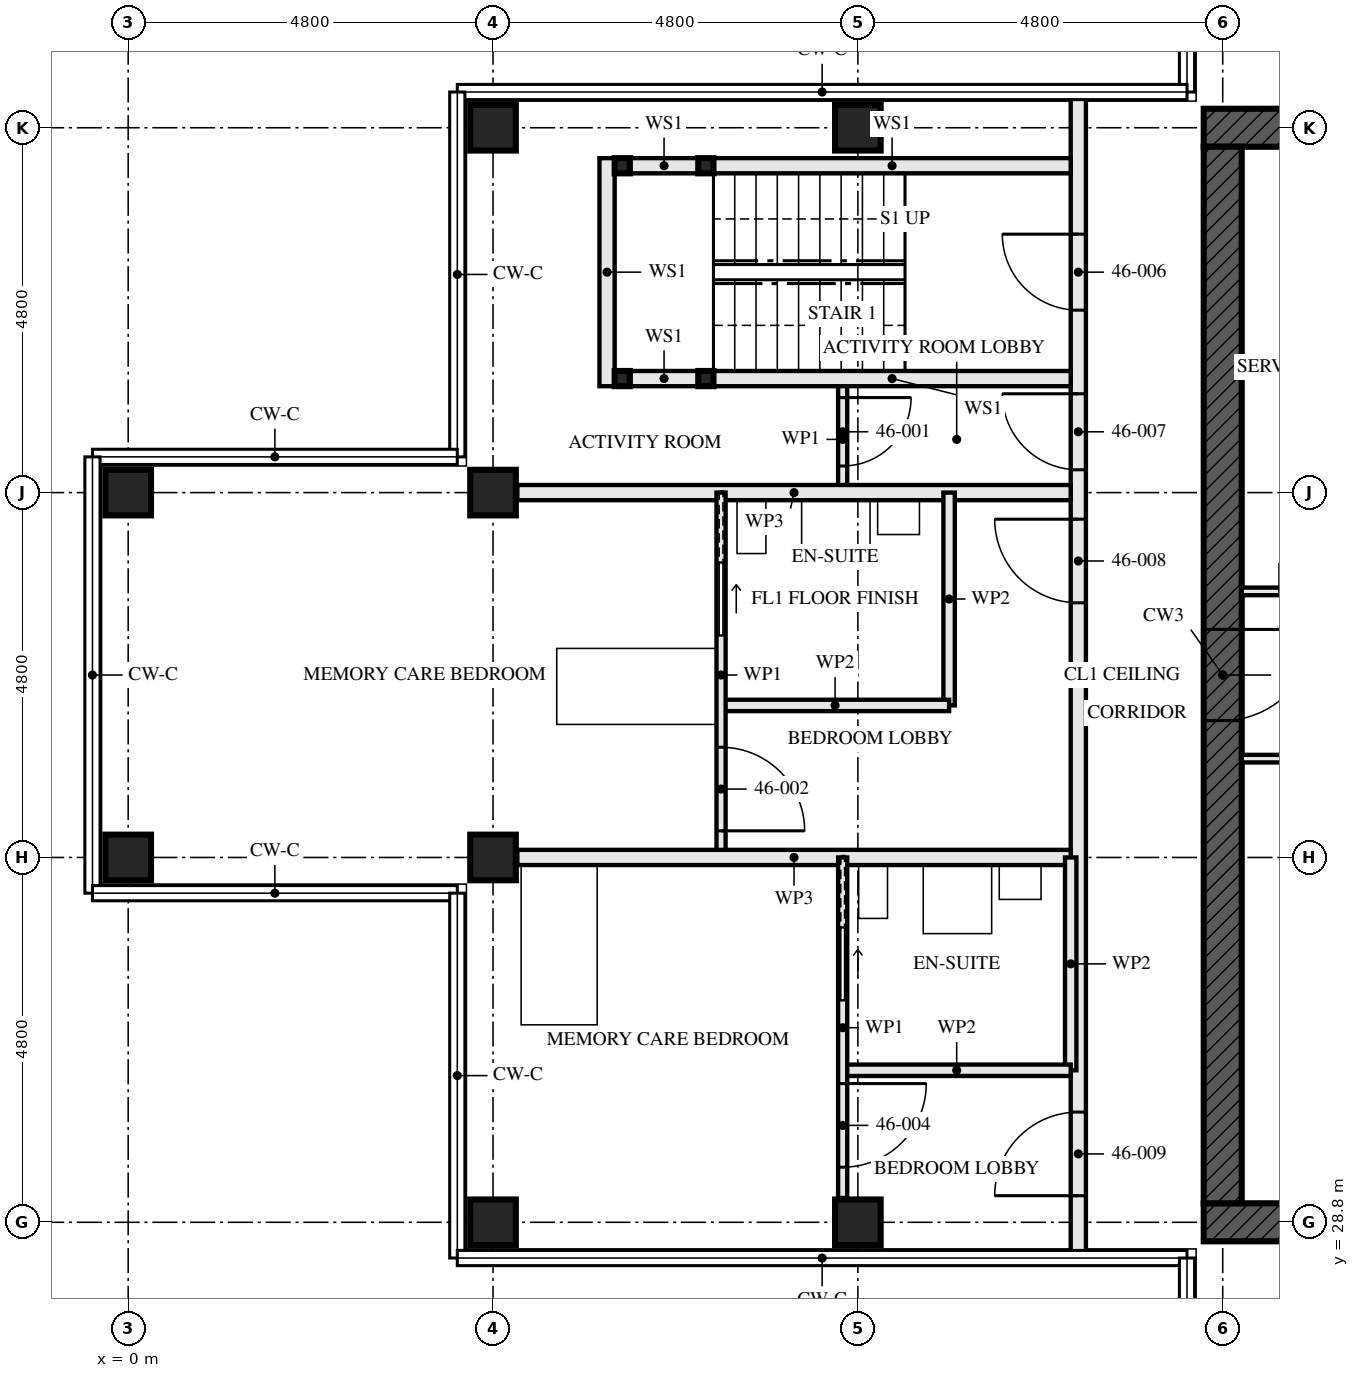
"""IFC4 building model, lengths in metres.
Left out: names, types, materials, properties, quantities, classifications, styles, units other than length and angle.
Written with IfcOpenShell. Run it as: python <this file> out.ifc"""

import sys

from ifc_helpers import new_model, si_unit, direction, frame, frame_2d, origin, origin_2d, place, context, subcontext, project, spatial, rectangle, hollow_rectangle, extrude, element, fill, save


model = new_model("IFC4")
c1 = context("Model", 3, precision=1e-05, world=origin(), true_north=direction((0.0, 1.0)))
c2 = subcontext(c1, "Body", "Model", "MODEL_VIEW")
j1 = project(units=[si_unit("LENGTHUNIT", "METRE"), si_unit("PLANEANGLEUNIT", "RADIAN")], contexts=[c1])
p1 = place(None, origin())
s1 = spatial("IfcSite", under=j1, at=p1, CompositionType="ELEMENT")
p2 = place(p1, origin())
s2 = spatial("IfcBuilding", under=s1, at=p2, CompositionType="ELEMENT")
p3 = place(p2, frame((0.0, 0.0, 169.0)))
s3 = spatial("IfcBuildingStorey", under=s2, at=p3, CompositionType="ELEMENT", Elevation=169.0)
for number, where, z_axis, x_axis in (
    (1, (0.0, 33.6, 0.0), (0.0, 0.0, 1.0), (0.0, 1.0, 0.0)),
    (2, (0.0, 38.4, 0.0), (0.0, 0.0, 1.0), (0.0, 1.0, 0.0)),
    (3, (4.8, 28.8, 0.0), (0.0, 0.0, 1.0), (0.0, 1.0, 0.0)),
    (4, (4.8, 33.6, 0.0), (0.0, 0.0, 1.0), (0.0, 1.0, 0.0)),
    (5, (4.8, 38.4, 0.0), (0.0, 0.0, 1.0), (0.0, 1.0, 0.0)),
    (6, (4.8, 43.2, 0.0), (0.0, 0.0, 1.0), (0.0, 1.0, 0.0)),
):
    element("IfcColumn", number, at=place(p3, frame(where, z_axis=z_axis, x_axis=x_axis)), inside=s3, PredefinedType="COLUMN", context=c2, shape_type="SweptSolid", body=[
        extrude(hollow_rectangle(XDim=0.6, YDim=0.6, WallThickness=0.06, at=origin_2d()), origin(), (0.0, 0.0, 1.0), 3.5),
    ])
for number, where, z_axis, x_axis in (
    (7, (9.6, 28.8, 0.0), (0.0, 0.0, 1.0), (0.0, 1.0, 0.0)),
    (8, (9.6, 43.2, 0.0), (0.0, 0.0, 1.0), (0.0, 1.0, 0.0)),
):
    element("IfcColumn", number, at=place(p3, frame(where, z_axis=z_axis, x_axis=x_axis)), inside=s3, PredefinedType="COLUMN", context=c2, shape_type="SweptSolid", body=[
        extrude(hollow_rectangle(XDim=0.6, YDim=0.6, WallThickness=0.08, at=origin_2d()), origin(), (0.0, 0.0, 1.0), 3.5),
    ])
p4 = place(p3, frame((14.15, 28.8, -0.17), z_axis=(0.0, 0.0, 1.0), x_axis=(1.0, 0.0, 0.0)))
e9 = element("IfcWall", 9, at=p4, inside=s3, PredefinedType="SHEAR", context=c2, shape_type="SweptSolid", body=[
    extrude(rectangle(XDim=14.9, YDim=0.5, at=frame_2d((7.45, 0.0))), origin(), (0.0, 0.0, 1.0), 3.5),
])
p5 = place(p4, frame((6.85, 0.0, 0.17)))
e10 = element("IfcOpeningElement", 10, at=p5, cuts=e9, PredefinedType="OPENING", context=c2, shape_type="SweptSolid", body=[
    extrude(rectangle(XDim=1.2, YDim=2.1, at=frame_2d((0.6, 1.05))), frame((0.0, 0.26, 0.0), z_axis=(0.0, -1.0, 0.0), x_axis=(1.0, 0.0, 0.0)), (0.0, 0.0, 1.0), 0.521),
])
p6 = place(p3, frame((29.05, 43.2, -0.17), z_axis=(0.0, 0.0, 1.0), x_axis=(-1.0, 0.0, 0.0)))
e11 = element("IfcWall", 11, at=p6, inside=s3, PredefinedType="SHEAR", context=c2, shape_type="SweptSolid", body=[
    extrude(rectangle(XDim=14.9, YDim=0.5, at=frame_2d((7.45, 0.0))), origin(), (0.0, 0.0, 1.0), 3.5),
])
p7 = place(p6, frame((6.85, 0.0, 0.17)))
e12 = element("IfcOpeningElement", 12, at=p7, cuts=e11, PredefinedType="OPENING", context=c2, shape_type="SweptSolid", body=[
    extrude(rectangle(XDim=1.2, YDim=2.1, at=frame_2d((0.6, 1.05))), frame((0.0, 0.26, 0.0), z_axis=(0.0, -1.0, 0.0), x_axis=(1.0, 0.0, 0.0)), (0.0, 0.0, 1.0), 0.521),
])
p8 = place(p3, frame((14.4, 42.95, -0.17), z_axis=(0.0, 0.0, 1.0), x_axis=(0.0, -1.0, 0.0)))
e13 = element("IfcWall", 13, at=p8, inside=s3, PredefinedType="SHEAR", context=c2, shape_type="SweptSolid", body=[
    extrude(rectangle(XDim=13.9, YDim=0.5, at=frame_2d((6.95, 0.0))), origin(), (0.0, 0.0, 1.0), 3.5),
])
p9 = place(p8, frame((6.35, 0.0, 0.17)))
e14 = element("IfcOpeningElement", 14, at=p9, cuts=e13, PredefinedType="OPENING", context=c2, shape_type="SweptSolid", body=[
    extrude(rectangle(XDim=1.2, YDim=2.1, at=frame_2d((0.6, 1.05))), frame((0.0, 0.26, 0.0), z_axis=(0.0, -1.0, 0.0), x_axis=(1.0, 0.0, 0.0)), (0.0, 0.0, 1.0), 0.521),
])
for number, where, z_axis, x_axis in (
    (15, (6.5, 42.7, 0.0), (0.0, 0.0, 1.0), (1.0, 0.0, 0.0)),
    (16, (6.5, 39.9, 0.0), (0.0, 0.0, 1.0), (1.0, 0.0, 0.0)),
    (17, (7.6, 42.7, 0.0), (0.0, 0.0, 1.0), (1.0, 0.0, 0.0)),
    (18, (7.6, 39.9, 0.0), (0.0, 0.0, 1.0), (1.0, 0.0, 0.0)),
):
    element("IfcColumn", number, at=place(p3, frame(where, z_axis=z_axis, x_axis=x_axis)), inside=s3, PredefinedType="COLUMN", context=c2, shape_type="SweptSolid", body=[
        extrude(hollow_rectangle(XDim=0.2, YDim=0.2, WallThickness=0.008, at=origin_2d()), origin(), (0.0, 0.0, 1.0), 3.33),
    ])
p10 = place(p3, frame((6.6, 42.7, 0.0), z_axis=(0.0, 0.0, 1.0), x_axis=(1.0, 0.0, 0.0)))
e19 = element("IfcWall", 19, at=p10, inside=s3, PredefinedType="SOLIDWALL", context=c2, shape_type="SweptSolid", body=[
    extrude(rectangle(XDim=0.9, YDim=0.2, at=frame_2d((0.45, 0.0))), origin(), (0.0, 0.0, 1.0), 2.99),
])
p11 = place(p3, frame((7.7, 42.7, 0.0), z_axis=(0.0, 0.0, 1.0), x_axis=(1.0, 0.0, 0.0)))
e20 = element("IfcWall", 20, at=p11, inside=s3, PredefinedType="SOLIDWALL", context=c2, shape_type="SweptSolid", body=[
    extrude(rectangle(XDim=4.7, YDim=0.2, at=frame_2d((2.35, 0.0))), origin(), (0.0, 0.0, 1.0), 2.99),
])
p12 = place(p3, frame((6.6, 39.9, 0.0), z_axis=(0.0, 0.0, 1.0), x_axis=(1.0, 0.0, 0.0)))
e21 = element("IfcWall", 21, at=p12, inside=s3, PredefinedType="SOLIDWALL", context=c2, shape_type="SweptSolid", body=[
    extrude(rectangle(XDim=0.9, YDim=0.2, at=frame_2d((0.45, 0.0))), origin(), (0.0, 0.0, 1.0), 2.99),
])
p13 = place(p3, frame((7.7, 39.9, 0.0), z_axis=(0.0, 0.0, 1.0), x_axis=(1.0, 0.0, 0.0)))
e22 = element("IfcWall", 22, at=p13, inside=s3, PredefinedType="SOLIDWALL", context=c2, shape_type="SweptSolid", body=[
    extrude(rectangle(XDim=4.7, YDim=0.2, at=frame_2d((2.35, 0.0))), origin(), (0.0, 0.0, 1.0), 2.99),
])
p14 = place(p3, frame((6.3, 42.8, 0.0), z_axis=(0.0, 0.0, 1.0), x_axis=(0.0, -1.0, 0.0)))
e23 = element("IfcWall", 23, at=p14, inside=s3, PredefinedType="SOLIDWALL", context=c2, shape_type="SweptSolid", body=[
    extrude(rectangle(XDim=3.0, YDim=0.2, at=frame_2d((1.5, 0.0))), origin(), (0.0, 0.0, 1.0), 3.33),
])
p15 = place(p3, frame((9.4, 39.8, 0.0), z_axis=(0.0, 0.0, 1.0), x_axis=(0.0, -1.0, 0.0)))
e24 = element("IfcWall", 24, at=p15, inside=s3, PredefinedType="PARTITIONING", context=c2, shape_type="SweptSolid", body=[
    extrude(rectangle(XDim=1.4, YDim=0.12, at=frame_2d((0.7, 0.0))), origin(), (0.0, 0.0, 1.0), 3.33),
])
p16 = place(p15, frame((0.15, 0.0, 0.0)))
e25 = element("IfcOpeningElement", 25, at=p16, cuts=e24, PredefinedType="OPENING", context=c2, shape_type="SweptSolid", body=[
    extrude(rectangle(XDim=0.9, YDim=2.1, at=frame_2d((0.45, 1.05))), frame((0.0, 0.071, 0.0), z_axis=(0.0, -1.0, 0.0), x_axis=(1.0, 0.0, 0.0)), (0.0, 0.0, 1.0), 0.141),
])
p17 = place(p3, frame((5.12, 38.4, 0.0), z_axis=(0.0, 0.0, 1.0), x_axis=(1.0, 0.0, 0.0)))
e26 = element("IfcWall", 26, at=p17, inside=s3, PredefinedType="PARTITIONING", context=c2, shape_type="SweptSolid", body=[
    extrude(rectangle(XDim=7.28, YDim=0.2, at=frame_2d((3.64, 0.0))), origin(), (0.0, 0.0, 1.0), 2.55),
])
p18 = place(p3, frame((7.8, 35.6, 0.0), z_axis=(0.0, 0.0, 1.0), x_axis=(1.0, 0.0, 0.0)))
e27 = element("IfcWall", 27, at=p18, inside=s3, PredefinedType="PARTITIONING", context=c2, shape_type="SweptSolid", body=[
    extrude(rectangle(XDim=3.0, YDim=0.15, at=frame_2d((1.5, 0.0))), origin(), (0.0, 0.0, 1.0), 3.33),
])
p19 = place(p3, frame((10.8, 38.4, 0.0), z_axis=(0.0, 0.0, 1.0), x_axis=(0.0, -1.0, 0.0)))
e28 = element("IfcWall", 28, at=p19, inside=s3, PredefinedType="PARTITIONING", context=c2, shape_type="SweptSolid", body=[
    extrude(rectangle(XDim=2.8, YDim=0.15, at=frame_2d((1.4, 0.0))), origin(), (0.0, 0.0, 1.0), 3.33),
])
p20 = place(p3, frame((7.8, 38.4, 0.0), z_axis=(0.0, 0.0, 1.0), x_axis=(0.0, -1.0, 0.0)))
e29 = element("IfcWall", 29, at=p20, inside=s3, PredefinedType="PARTITIONING", context=c2, shape_type="SweptSolid", body=[
    extrude(rectangle(XDim=4.8, YDim=0.12, at=frame_2d((2.4, 0.0))), origin(), (0.0, 0.0, 1.0), 3.33),
])
p21 = place(p20, frame((3.35, 0.0, 0.0)))
e30 = element("IfcOpeningElement", 30, at=p21, cuts=e29, PredefinedType="OPENING", context=c2, shape_type="SweptSolid", body=[
    extrude(rectangle(XDim=1.1, YDim=2.1, at=frame_2d((0.55, 1.05))), frame((0.0, 0.071, 0.0), z_axis=(0.0, -1.0, 0.0), x_axis=(1.0, 0.0, 0.0)), (0.0, 0.0, 1.0), 0.141),
])
p22 = place(p20, frame((0.925, 0.0, 0.0)))
e31 = element("IfcOpeningElement", 31, at=p22, cuts=e29, PredefinedType="OPENING", context=c2, shape_type="SweptSolid", body=[
    extrude(rectangle(XDim=0.95, YDim=2.1, at=frame_2d((0.475, 1.05))), frame((0.0, 0.071, 0.0), z_axis=(0.0, -1.0, 0.0), x_axis=(1.0, 0.0, 0.0)), (0.0, 0.0, 1.0), 0.141),
])
p23 = place(p3, frame((5.12, 33.6, 0.0), z_axis=(0.0, 0.0, 1.0), x_axis=(1.0, 0.0, 0.0)))
e32 = element("IfcWall", 32, at=p23, inside=s3, PredefinedType="PARTITIONING", context=c2, shape_type="SweptSolid", body=[
    extrude(rectangle(XDim=7.28, YDim=0.2, at=frame_2d((3.64, 0.0))), origin(), (0.0, 0.0, 1.0), 2.55),
])
p24 = place(p3, frame((9.4, 30.8, 0.0), z_axis=(0.0, 0.0, 1.0), x_axis=(1.0, 0.0, 0.0)))
e33 = element("IfcWall", 33, at=p24, inside=s3, PredefinedType="PARTITIONING", context=c2, shape_type="SweptSolid", body=[
    extrude(rectangle(XDim=3.0, YDim=0.15, at=frame_2d((1.5, 0.0))), origin(), (0.0, 0.0, 1.0), 3.33),
])
p25 = place(p3, frame((12.4, 33.6, 0.0), z_axis=(0.0, 0.0, 1.0), x_axis=(0.0, -1.0, 0.0)))
e34 = element("IfcWall", 34, at=p25, inside=s3, PredefinedType="PARTITIONING", context=c2, shape_type="SweptSolid", body=[
    extrude(rectangle(XDim=2.8, YDim=0.15, at=frame_2d((1.4, 0.0))), origin(), (0.0, 0.0, 1.0), 3.33),
])
p26 = place(p3, frame((9.4, 33.6, 0.0), z_axis=(0.0, 0.0, 1.0), x_axis=(0.0, -1.0, 0.0)))
e35 = element("IfcWall", 35, at=p26, inside=s3, PredefinedType="PARTITIONING", context=c2, shape_type="SweptSolid", body=[
    extrude(rectangle(XDim=4.48, YDim=0.12, at=frame_2d((2.24, 0.0))), origin(), (0.0, 0.0, 1.0), 3.33),
])
p27 = place(p26, frame((2.975, 0.0, 0.0)))
e36 = element("IfcOpeningElement", 36, at=p27, cuts=e35, PredefinedType="OPENING", context=c2, shape_type="SweptSolid", body=[
    extrude(rectangle(XDim=1.1, YDim=2.1, at=frame_2d((0.55, 1.05))), frame((0.0, 0.071, 0.0), z_axis=(0.0, -1.0, 0.0), x_axis=(1.0, 0.0, 0.0)), (0.0, 0.0, 1.0), 0.141),
])
p28 = place(p26, frame((0.925, 0.0, 0.0)))
e37 = element("IfcOpeningElement", 37, at=p28, cuts=e35, PredefinedType="OPENING", context=c2, shape_type="SweptSolid", body=[
    extrude(rectangle(XDim=0.95, YDim=2.1, at=frame_2d((0.475, 1.05))), frame((0.0, 0.071, 0.0), z_axis=(0.0, -1.0, 0.0), x_axis=(1.0, 0.0, 0.0)), (0.0, 0.0, 1.0), 0.141),
])
p29 = place(p3, frame((12.5, 43.65, 0.0), z_axis=(0.0, 0.0, 1.0), x_axis=(0.0, -1.0, 0.0)))
e38 = element("IfcWall", 38, at=p29, inside=s3, PredefinedType="PARTITIONING", context=c2, shape_type="SweptSolid", body=[
    extrude(rectangle(XDim=15.3, YDim=0.2, at=frame_2d((7.65, 0.0))), origin(), (0.0, 0.0, 1.0), 2.32),
])
p30 = place(p29, frame((1.85, 0.0, 0.0)))
e39 = element("IfcOpeningElement", 39, at=p30, cuts=e38, PredefinedType="OPENING", context=c2, shape_type="SweptSolid", body=[
    extrude(rectangle(XDim=1.0, YDim=2.1, at=frame_2d((0.5, 1.05))), frame((0.0, 0.111, 0.0), z_axis=(0.0, -1.0, 0.0), x_axis=(1.0, 0.0, 0.0)), (0.0, 0.0, 1.0), 0.221),
])
p31 = place(p29, frame((3.95, 0.0, 0.0)))
e40 = element("IfcOpeningElement", 40, at=p31, cuts=e38, PredefinedType="OPENING", context=c2, shape_type="SweptSolid", body=[
    extrude(rectangle(XDim=1.0, YDim=2.1, at=frame_2d((0.5, 1.05))), frame((0.0, 0.111, 0.0), z_axis=(0.0, -1.0, 0.0), x_axis=(1.0, 0.0, 0.0)), (0.0, 0.0, 1.0), 0.221),
])
p32 = place(p29, frame((5.6, 0.0, 0.0)))
e41 = element("IfcOpeningElement", 41, at=p32, cuts=e38, PredefinedType="OPENING", context=c2, shape_type="SweptSolid", body=[
    extrude(rectangle(XDim=1.1, YDim=2.1, at=frame_2d((0.55, 1.05))), frame((0.0, 0.111, 0.0), z_axis=(0.0, -1.0, 0.0), x_axis=(1.0, 0.0, 0.0)), (0.0, 0.0, 1.0), 0.221),
])
p33 = place(p29, frame((13.4, 0.0, 0.0)))
e42 = element("IfcOpeningElement", 42, at=p33, cuts=e38, PredefinedType="OPENING", context=c2, shape_type="SweptSolid", body=[
    extrude(rectangle(XDim=1.1, YDim=2.1, at=frame_2d((0.55, 1.05))), frame((0.0, 0.111, 0.0), z_axis=(0.0, -1.0, 0.0), x_axis=(1.0, 0.0, 0.0)), (0.0, 0.0, 1.0), 0.221),
])
p34 = place(p3, frame((14.65, 34.9, 0.0), z_axis=(0.0, 0.0, 1.0), x_axis=(1.0, 0.0, 0.0)))
e43 = element("IfcWall", 43, at=p34, inside=s3, PredefinedType="SOLIDWALL", context=c2, shape_type="SweptSolid", body=[
    extrude(rectangle(XDim=5.9, YDim=0.1, at=frame_2d((2.95, 0.0))), origin(), (0.0, 0.0, 1.0), 3.33),
])
p35 = place(p34, frame((1.6, 0.0, 0.0)))
e44 = element("IfcOpeningElement", 44, at=p35, cuts=e43, PredefinedType="OPENING", context=c2, shape_type="SweptSolid", body=[
    extrude(rectangle(XDim=0.7, YDim=2.1, at=frame_2d((0.35, 1.05))), frame((0.0, 0.061, 0.0), z_axis=(0.0, -1.0, 0.0), x_axis=(1.0, 0.0, 0.0)), (0.0, 0.0, 1.0), 0.121),
])
p36 = place(p3, frame((14.65, 37.1, 0.0), z_axis=(0.0, 0.0, 1.0), x_axis=(1.0, 0.0, 0.0)))
e45 = element("IfcWall", 45, at=p36, inside=s3, PredefinedType="SOLIDWALL", context=c2, shape_type="SweptSolid", body=[
    extrude(rectangle(XDim=5.9, YDim=0.1, at=frame_2d((2.95, 0.0))), origin(), (0.0, 0.0, 1.0), 3.33),
])
p37 = place(p36, frame((0.5, 0.0, 0.0)))
e46 = element("IfcOpeningElement", 46, at=p37, cuts=e45, PredefinedType="OPENING", context=c2, shape_type="SweptSolid", body=[
    extrude(rectangle(XDim=0.7, YDim=2.1, at=frame_2d((0.35, 1.05))), frame((0.0, 0.061, 0.0), z_axis=(0.0, -1.0, 0.0), x_axis=(1.0, 0.0, 0.0)), (0.0, 0.0, 1.0), 0.121),
])
p38 = place(p36, frame((1.9, 0.0, 0.0)))
e47 = element("IfcOpeningElement", 47, at=p38, cuts=e45, PredefinedType="OPENING", context=c2, shape_type="SweptSolid", body=[
    extrude(rectangle(XDim=0.9, YDim=2.1, at=frame_2d((0.45, 1.05))), frame((0.0, 0.061, 0.0), z_axis=(0.0, -1.0, 0.0), x_axis=(1.0, 0.0, 0.0)), (0.0, 0.0, 1.0), 0.121),
])
p39 = place(p16, origin())
e48 = element("IfcDoor", 48, at=p39, inside=s3, OperationType="SINGLE_SWING_RIGHT", PredefinedType="DOOR", context=c2, shape_type="SweptSolid", body=[
    extrude(rectangle(XDim=0.9, YDim=2.1, at=frame_2d((0.45, 1.05))), frame((0.0, 0.022, 0.0), z_axis=(0.0, -1.0, 0.0), x_axis=(1.0, 0.0, 0.0)), (0.0, 0.0, 1.0), 0.044),
])
fill(e25, e48)
p40 = place(p21, origin())
e49 = element("IfcDoor", 49, at=p40, inside=s3, OperationType="SINGLE_SWING_LEFT", PredefinedType="DOOR", context=c2, shape_type="SweptSolid", body=[
    extrude(rectangle(XDim=1.1, YDim=2.1, at=frame_2d((0.55, 1.05))), frame((0.0, 0.022, 0.0), z_axis=(0.0, -1.0, 0.0), x_axis=(1.0, 0.0, 0.0)), (0.0, 0.0, 1.0), 0.044),
])
fill(e30, e49)
p41 = place(p22, origin())
e50 = element("IfcDoor", 50, at=p41, inside=s3, OperationType="SLIDING_TO_RIGHT", PredefinedType="DOOR", context=c2, shape_type="SweptSolid", body=[
    extrude(rectangle(XDim=0.95, YDim=2.1, at=frame_2d((0.475, 1.05))), frame((0.0, 0.022, 0.0), z_axis=(0.0, -1.0, 0.0), x_axis=(1.0, 0.0, 0.0)), (0.0, 0.0, 1.0), 0.044),
])
fill(e31, e50)
p42 = place(p27, origin())
e51 = element("IfcDoor", 51, at=p42, inside=s3, OperationType="SINGLE_SWING_RIGHT", PredefinedType="DOOR", context=c2, shape_type="SweptSolid", body=[
    extrude(rectangle(XDim=1.1, YDim=2.1, at=frame_2d((0.55, 1.05))), frame((0.0, 0.022, 0.0), z_axis=(0.0, -1.0, 0.0), x_axis=(1.0, 0.0, 0.0)), (0.0, 0.0, 1.0), 0.044),
])
fill(e36, e51)
p43 = place(p28, origin())
e52 = element("IfcDoor", 52, at=p43, inside=s3, OperationType="SLIDING_TO_RIGHT", PredefinedType="DOOR", context=c2, shape_type="SweptSolid", body=[
    extrude(rectangle(XDim=0.95, YDim=2.1, at=frame_2d((0.475, 1.05))), frame((0.0, 0.022, 0.0), z_axis=(0.0, -1.0, 0.0), x_axis=(1.0, 0.0, 0.0)), (0.0, 0.0, 1.0), 0.044),
])
fill(e37, e52)
p44 = place(p30, frame((1.0, 0.0, 0.0), z_axis=(0.0, 0.0, 1.0), x_axis=(-1.0, 0.0, 0.0)))
e53 = element("IfcDoor", 53, at=p44, inside=s3, OperationType="SINGLE_SWING_LEFT", PredefinedType="DOOR", context=c2, shape_type="SweptSolid", body=[
    extrude(rectangle(XDim=1.0, YDim=2.1, at=frame_2d((0.5, 1.05))), frame((0.0, 0.032, 0.0), z_axis=(0.0, -1.0, 0.0), x_axis=(1.0, 0.0, 0.0)), (0.0, 0.0, 1.0), 0.064),
])
fill(e39, e53)
p45 = place(p31, frame((1.0, 0.0, 0.0), z_axis=(0.0, 0.0, 1.0), x_axis=(-1.0, 0.0, 0.0)))
e54 = element("IfcDoor", 54, at=p45, inside=s3, OperationType="SINGLE_SWING_LEFT", PredefinedType="DOOR", context=c2, shape_type="SweptSolid", body=[
    extrude(rectangle(XDim=1.0, YDim=2.1, at=frame_2d((0.5, 1.05))), frame((0.0, 0.027, 0.0), z_axis=(0.0, -1.0, 0.0), x_axis=(1.0, 0.0, 0.0)), (0.0, 0.0, 1.0), 0.054),
])
fill(e40, e54)
p46 = place(p32, frame((1.1, 0.0, 0.0), z_axis=(0.0, 0.0, 1.0), x_axis=(-1.0, 0.0, 0.0)))
e55 = element("IfcDoor", 55, at=p46, inside=s3, OperationType="SINGLE_SWING_LEFT", PredefinedType="DOOR", context=c2, shape_type="SweptSolid", body=[
    extrude(rectangle(XDim=1.1, YDim=2.1, at=frame_2d((0.55, 1.05))), frame((0.0, 0.027, 0.0), z_axis=(0.0, -1.0, 0.0), x_axis=(1.0, 0.0, 0.0)), (0.0, 0.0, 1.0), 0.054),
])
fill(e41, e55)
p47 = place(p33, frame((1.1, 0.0, 0.0), z_axis=(0.0, 0.0, 1.0), x_axis=(-1.0, 0.0, 0.0)))
e56 = element("IfcDoor", 56, at=p47, inside=s3, OperationType="SINGLE_SWING_RIGHT", PredefinedType="DOOR", context=c2, shape_type="SweptSolid", body=[
    extrude(rectangle(XDim=1.1, YDim=2.1, at=frame_2d((0.55, 1.05))), frame((0.0, 0.027, 0.0), z_axis=(0.0, -1.0, 0.0), x_axis=(1.0, 0.0, 0.0)), (0.0, 0.0, 1.0), 0.054),
])
fill(e42, e56)
p48 = place(p9, origin())
e57 = element("IfcDoor", 57, at=p48, inside=s3, OperationType="SINGLE_SWING_LEFT", PredefinedType="DOOR", context=c2, shape_type="SweptSolid", body=[
    extrude(rectangle(XDim=1.2, YDim=2.1, at=frame_2d((0.6, 1.05))), frame((0.0, 0.027, 0.0), z_axis=(0.0, -1.0, 0.0), x_axis=(1.0, 0.0, 0.0)), (0.0, 0.0, 1.0), 0.054),
])
fill(e14, e57)
save(model, sys.argv[1])
